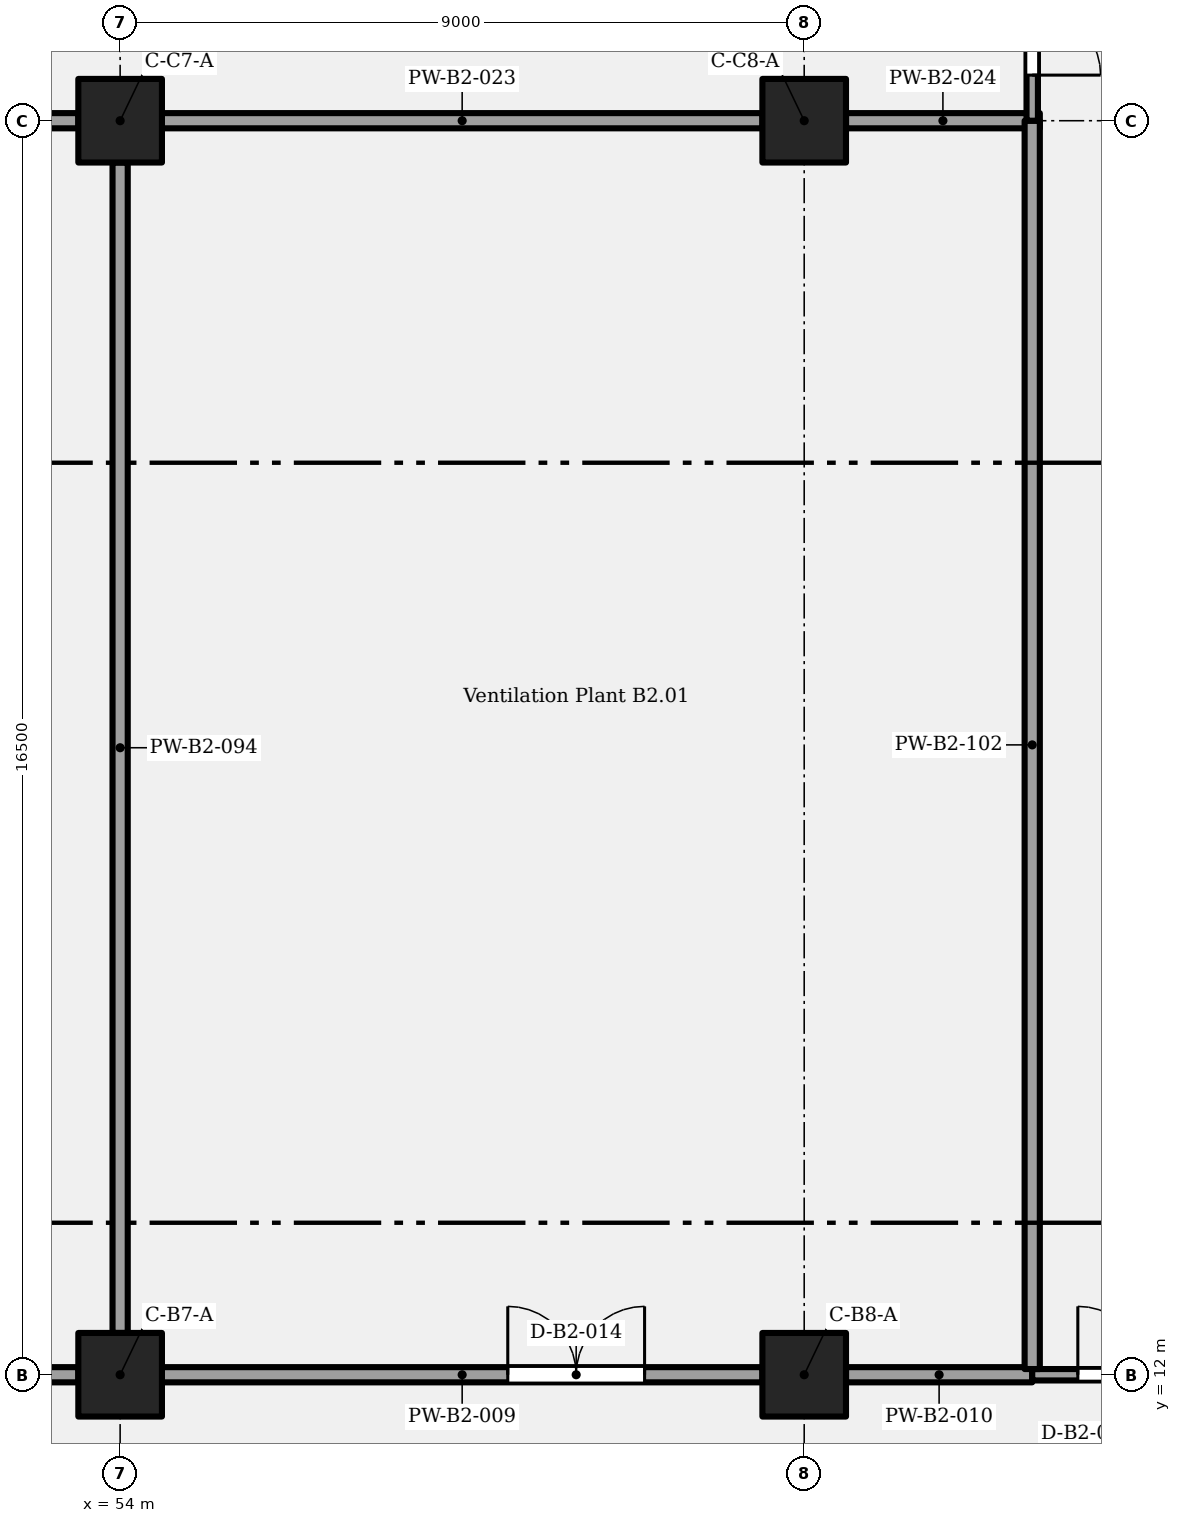
"""IFC4 building model, lengths in metres.
Left out: names, types, materials, properties, quantities, classifications, styles, units other than length and angle.
Written with IfcOpenShell. Run it as: python <this file> out.ifc"""

import sys

from ifc_helpers import new_model, si_unit, direction, frame, frame_2d, origin, origin_2d, place, context, subcontext, project, spatial, rectangle, extrude, element, fill, save


model = new_model("IFC4")
c1 = context("Model", 3, precision=1e-05, world=origin(), true_north=direction((0.0, 1.0)))
c2 = subcontext(c1, "Body", "Model", "MODEL_VIEW")
j1 = project(units=[si_unit("LENGTHUNIT", "METRE"), si_unit("PLANEANGLEUNIT", "RADIAN")], contexts=[c1])
p1 = place(None, origin())
s1 = spatial("IfcSite", under=j1, at=p1, CompositionType="ELEMENT")
p2 = place(p1, origin())
s2 = spatial("IfcBuilding", under=s1, at=p2, CompositionType="ELEMENT")
p3 = place(p2, frame((0.0, 0.0, -8.4)))
s3 = spatial("IfcBuildingStorey", under=s2, at=p3, CompositionType="ELEMENT", Elevation=-8.4)
for number, where, z_axis, x_axis in (
    (1, (54.0, 12.0, 0.0), (0.0, 0.0, 1.0), (1.0, 0.0, 0.0)),
    (2, (63.0, 12.0, 0.0), (0.0, 0.0, 1.0), (1.0, 0.0, 0.0)),
    (3, (54.0, 28.5, 0.0), (0.0, 0.0, 1.0), (1.0, 0.0, 0.0)),
    (4, (63.0, 28.5, 0.0), (0.0, 0.0, 1.0), (1.0, 0.0, 0.0)),
):
    element("IfcColumn", number, at=place(p3, frame(where, z_axis=z_axis, x_axis=x_axis)), inside=s3, PredefinedType="COLUMN", context=c2, shape_type="SweptSolid", body=[
        extrude(rectangle(XDim=1.1, YDim=1.1, at=origin_2d()), origin(), (0.0, 0.0, 1.0), 4.2),
    ])
p4 = place(p3, frame((45.55, 12.0, 0.0), z_axis=(0.0, 0.0, 1.0), x_axis=(1.0, 0.0, 0.0)))
e5 = element("IfcWall", 5, at=p4, inside=s3, PredefinedType="PARTITIONING", context=c2, shape_type="SweptSolid", body=[
    extrude(rectangle(XDim=7.9, YDim=0.2, at=frame_2d((3.95, 0.0))), origin(), (0.0, 0.0, 1.0), 3.05),
])
p5 = place(p4, frame((3.45, 0.0, 0.0)))
e6 = element("IfcOpeningElement", 6, at=p5, cuts=e5, PredefinedType="OPENING", context=c2, shape_type="SweptSolid", body=[
    extrude(rectangle(XDim=1.0, YDim=2.1, at=frame_2d((0.5, 1.05))), frame((0.0, 0.11, 0.0), z_axis=(0.0, -1.0, 0.0), x_axis=(1.0, 0.0, 0.0)), (0.0, 0.0, 1.0), 0.22),
])
p6 = place(p3, frame((54.55, 12.0, 0.0), z_axis=(0.0, 0.0, 1.0), x_axis=(1.0, 0.0, 0.0)))
e7 = element("IfcWall", 7, at=p6, inside=s3, PredefinedType="PARTITIONING", context=c2, shape_type="SweptSolid", body=[
    extrude(rectangle(XDim=7.9, YDim=0.2, at=frame_2d((3.95, 0.0))), origin(), (0.0, 0.0, 1.0), 3.05),
])
p7 = place(p6, frame((4.55, 0.0, 0.0)))
e8 = element("IfcOpeningElement", 8, at=p7, cuts=e7, PredefinedType="OPENING", context=c2, shape_type="SweptSolid", body=[
    extrude(rectangle(XDim=1.8, YDim=2.4, at=frame_2d((0.9, 1.2))), frame((0.0, 0.11, 0.0), z_axis=(0.0, -1.0, 0.0), x_axis=(1.0, 0.0, 0.0)), (0.0, 0.0, 1.0), 0.22),
])
p8 = place(p3, frame((63.55, 12.0, 0.0), z_axis=(0.0, 0.0, 1.0), x_axis=(1.0, 0.0, 0.0)))
e9 = element("IfcWall", 9, at=p8, inside=s3, PredefinedType="PARTITIONING", context=c2, shape_type="SweptSolid", body=[
    extrude(rectangle(XDim=2.45, YDim=0.2, at=frame_2d((1.225, 0.0))), origin(), (0.0, 0.0, 1.0), 3.05),
])
p9 = place(p3, frame((66.0, 12.0, 0.0), z_axis=(0.0, 0.0, 1.0), x_axis=(1.0, 0.0, 0.0)))
e10 = element("IfcWall", 10, at=p9, inside=s3, PredefinedType="PARTITIONING", context=c2, shape_type="SweptSolid", body=[
    extrude(rectangle(XDim=3.0, YDim=0.15, at=frame_2d((1.5, 0.0))), origin(), (0.0, 0.0, 1.0), 3.05),
])
p10 = place(p9, frame((0.6, 0.0, 0.0)))
e11 = element("IfcOpeningElement", 11, at=p10, cuts=e10, PredefinedType="OPENING", context=c2, shape_type="SweptSolid", body=[
    extrude(rectangle(XDim=1.8, YDim=2.1, at=frame_2d((0.9, 1.05))), frame((0.0, 0.085, 0.0), z_axis=(0.0, -1.0, 0.0), x_axis=(1.0, 0.0, 0.0)), (0.0, 0.0, 1.0), 0.17),
])
for number, where, z_axis, x_axis in (
    (12, (45.55, 28.5, 0.0), (0.0, 0.0, 1.0), (1.0, 0.0, 0.0)),
    (13, (54.55, 28.5, 0.0), (0.0, 0.0, 1.0), (1.0, 0.0, 0.0)),
):
    element("IfcWall", number, at=place(p3, frame(where, z_axis=z_axis, x_axis=x_axis)), inside=s3, PredefinedType="PARTITIONING", context=c2, shape_type="SweptSolid", body=[
        extrude(rectangle(XDim=7.9, YDim=0.2, at=frame_2d((3.95, 0.0))), origin(), (0.0, 0.0, 1.0), 3.05),
    ])
p11 = place(p3, frame((63.55, 28.5, 0.0), z_axis=(0.0, 0.0, 1.0), x_axis=(1.0, 0.0, 0.0)))
e14 = element("IfcWall", 14, at=p11, inside=s3, PredefinedType="PARTITIONING", context=c2, shape_type="SweptSolid", body=[
    extrude(rectangle(XDim=2.55, YDim=0.2, at=frame_2d((1.275, 0.0))), origin(), (0.0, 0.0, 1.0), 3.05),
])
p12 = place(p3, frame((54.0, 12.55, 0.0), z_axis=(0.0, 0.0, 1.0), x_axis=(0.0, 1.0, 0.0)))
e15 = element("IfcWall", 15, at=p12, inside=s3, PredefinedType="PARTITIONING", context=c2, shape_type="SweptSolid", body=[
    extrude(rectangle(XDim=15.4, YDim=0.2, at=frame_2d((7.7, 0.0))), origin(), (0.0, 0.0, 1.0), 2.85),
])
p13 = place(p3, frame((66.0, 12.075, 0.0), z_axis=(0.0, 0.0, 1.0), x_axis=(0.0, 1.0, 0.0)))
e16 = element("IfcWall", 16, at=p13, inside=s3, PredefinedType="PARTITIONING", context=c2, shape_type="SweptSolid", body=[
    extrude(rectangle(XDim=16.425, YDim=0.2, at=frame_2d((8.212, 0.0))), origin(), (0.0, 0.0, 1.0), 3.8),
])
p14 = place(p3, frame((66.0, 28.5, 0.0), z_axis=(0.0, 0.0, 1.0), x_axis=(0.0, 1.0, 0.0)))
e17 = element("IfcWall", 17, at=p14, inside=s3, PredefinedType="PARTITIONING", context=c2, shape_type="SweptSolid", body=[
    extrude(rectangle(XDim=3.0, YDim=0.15, at=frame_2d((1.5, 0.0))), origin(), (0.0, 0.0, 1.0), 3.8),
])
p15 = place(p14, frame((2.4, 0.0, 0.0), z_axis=(0.0, 0.0, 1.0), x_axis=(-1.0, 0.0, 0.0)))
e18 = element("IfcOpeningElement", 18, at=p15, cuts=e17, PredefinedType="OPENING", context=c2, shape_type="SweptSolid", body=[
    extrude(rectangle(XDim=1.8, YDim=2.1, at=frame_2d((0.9, 1.05))), frame((0.0, 0.085, 0.0), z_axis=(0.0, -1.0, 0.0), x_axis=(1.0, 0.0, 0.0)), (0.0, 0.0, 1.0), 0.17),
])
p16 = place(p10, origin())
e19 = element("IfcDoor", 19, at=p16, inside=s3, OperationType="DOUBLE_DOOR_SINGLE_SWING", PredefinedType="DOOR", context=c2, shape_type="SweptSolid", body=[
    extrude(rectangle(XDim=1.8, YDim=2.1, at=frame_2d((0.9, 1.05))), frame((0.0, 0.025, 0.0), z_axis=(0.0, -1.0, 0.0), x_axis=(1.0, 0.0, 0.0)), (0.0, 0.0, 1.0), 0.05),
])
fill(e11, e19)
p17 = place(p15, origin())
e20 = element("IfcDoor", 20, at=p17, inside=s3, OperationType="DOUBLE_DOOR_SINGLE_SWING", PredefinedType="DOOR", context=c2, shape_type="SweptSolid", body=[
    extrude(rectangle(XDim=1.8, YDim=2.1, at=frame_2d((0.9, 1.05))), frame((0.0, 0.025, 0.0), z_axis=(0.0, -1.0, 0.0), x_axis=(1.0, 0.0, 0.0)), (0.0, 0.0, 1.0), 0.05),
])
fill(e18, e20)
p18 = place(p7, origin())
e21 = element("IfcDoor", 21, at=p18, inside=s3, OperationType="DOUBLE_DOOR_SINGLE_SWING", PredefinedType="DOOR", context=c2, shape_type="SweptSolid", body=[
    extrude(rectangle(XDim=1.8, YDim=2.4, at=frame_2d((0.9, 1.2))), frame((0.0, 0.025, 0.0), z_axis=(0.0, -1.0, 0.0), x_axis=(1.0, 0.0, 0.0)), (0.0, 0.0, 1.0), 0.05),
])
fill(e8, e21)
save(model, sys.argv[1])
